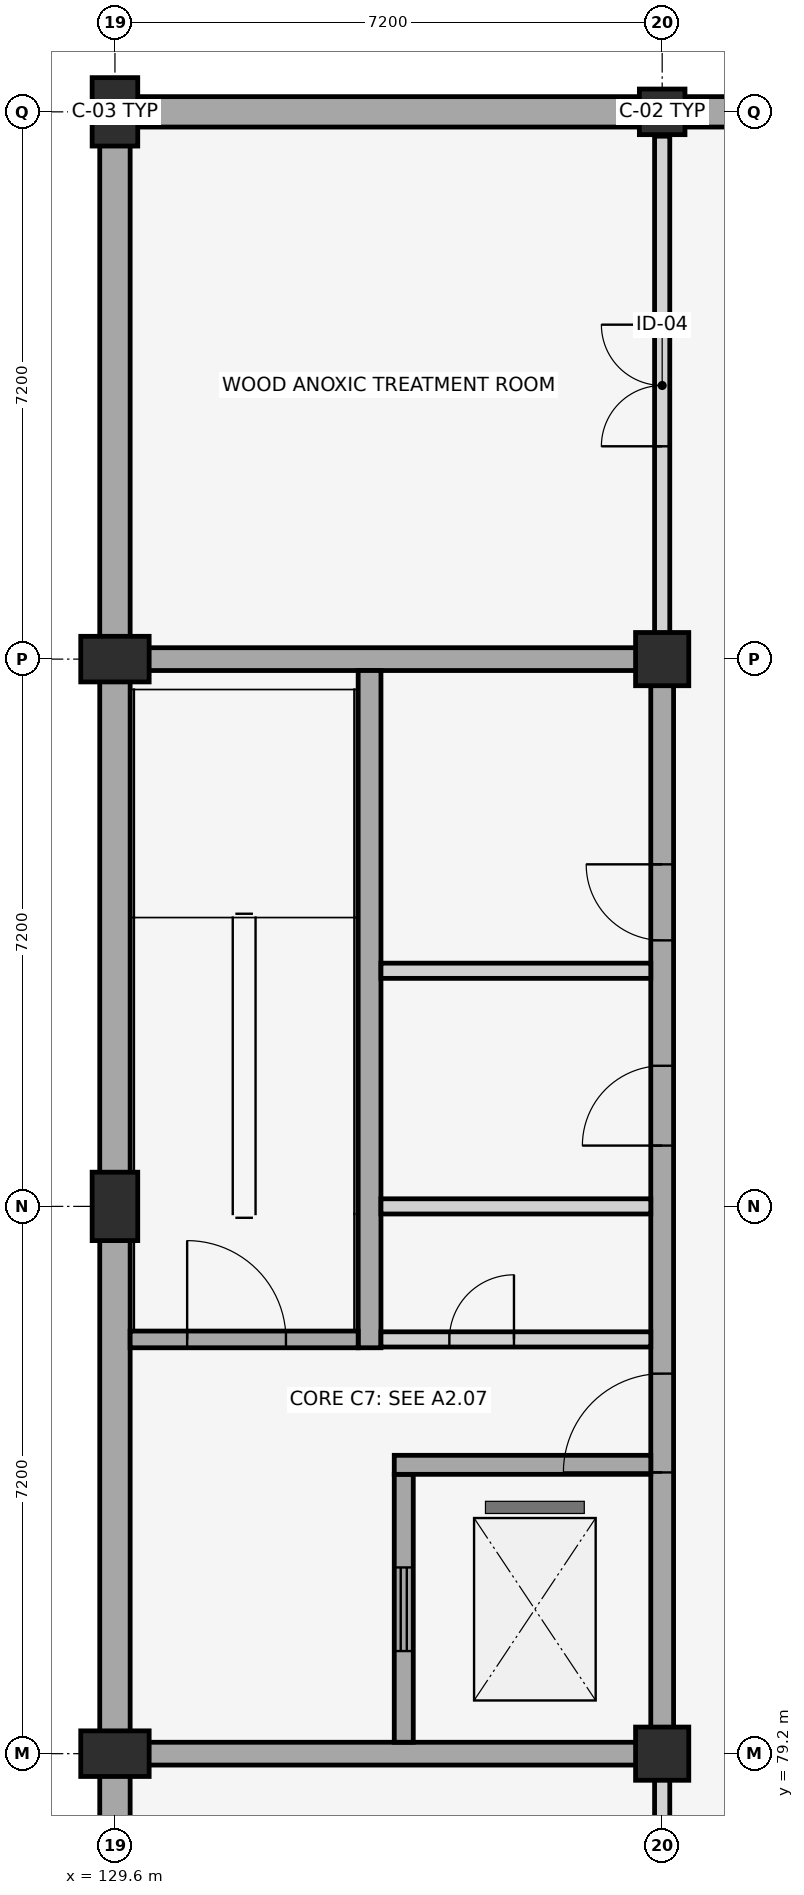
"""IFC4 building model, lengths in metres.
Left out: names, types, materials, properties, quantities, classifications, styles, units other than length and angle.
Written with IfcOpenShell. Run it as: python <this file> out.ifc"""

import sys

from ifc_helpers import new_model, si_unit, direction, frame, frame_2d, origin, origin_2d, place, context, subcontext, project, spatial, rectangle, extrude, element, fill, save


model = new_model("IFC4")
c1 = context("Model", 3, precision=1e-05, world=origin(), true_north=direction((0.0, 1.0)))
c2 = subcontext(c1, "Body", "Model", "MODEL_VIEW")
j1 = project(units=[si_unit("LENGTHUNIT", "METRE"), si_unit("PLANEANGLEUNIT", "RADIAN")], contexts=[c1])
p1 = place(None, origin())
s1 = spatial("IfcSite", under=j1, at=p1, CompositionType="ELEMENT")
p2 = place(p1, origin())
s2 = spatial("IfcBuilding", under=s1, at=p2, CompositionType="ELEMENT")
p3 = place(p2, frame((0.0, 0.0, -4.5)))
s3 = spatial("IfcBuildingStorey", under=s2, at=p3, CompositionType="ELEMENT", Elevation=-4.5)
p4 = place(p3, frame((165.8, 100.8, 0.0), z_axis=(0.0, 0.0, 1.0), x_axis=(-1.0, 0.0, 0.0)))
e1 = element("IfcWall", 1, at=p4, inside=s3, PredefinedType="USERDEFINED", context=c2, shape_type="SweptSolid", body=[
    extrude(rectangle(XDim=36.4, YDim=0.4, at=frame_2d((18.2, 0.0))), origin(), (0.0, 0.0, 1.0), 3.67),
])
p5 = place(p3, frame((129.6, 100.6, 0.0), z_axis=(0.0, 0.0, 1.0), x_axis=(0.0, -1.0, 0.0)))
e2 = element("IfcWall", 2, at=p5, inside=s3, PredefinedType="USERDEFINED", context=c2, shape_type="SweptSolid", body=[
    extrude(rectangle(XDim=86.0, YDim=0.4, at=frame_2d((43.0, 0.0))), origin(), (0.0, 0.0, 1.0), 3.67),
])
for number, where, z_axis, x_axis in (
    (3, (129.6, 79.2, -0.45), (0.0, 0.0, 1.0), (0.0, 1.0, 0.0)),
    (4, (129.6, 86.4, -0.45), (0.0, 0.0, 1.0), (1.0, 0.0, 0.0)),
    (5, (129.6, 93.6, -0.45), (0.0, 0.0, 1.0), (0.0, 1.0, 0.0)),
    (6, (129.6, 100.8, -0.45), (0.0, 0.0, 1.0), (1.0, 0.0, 0.0)),
):
    element("IfcColumn", number, at=place(p3, frame(where, z_axis=z_axis, x_axis=x_axis)), inside=s3, PredefinedType="PILASTER", context=c2, shape_type="SweptSolid", body=[
        extrude(rectangle(XDim=0.6, YDim=0.9, at=origin_2d()), origin(), (0.0, 0.0, 1.0), 4.95),
    ])
for number, where, z_axis, x_axis in (
    (7, (136.8, 79.2, -0.45), (0.0, 0.0, 1.0), (1.0, 0.0, 0.0)),
    (8, (136.8, 93.6, -0.45), (0.0, 0.0, 1.0), (1.0, 0.0, 0.0)),
):
    element("IfcColumn", number, at=place(p3, frame(where, z_axis=z_axis, x_axis=x_axis)), inside=s3, PredefinedType="COLUMN", context=c2, shape_type="SweptSolid", body=[
        extrude(rectangle(XDim=0.7, YDim=0.7, at=origin_2d()), origin(), (0.0, 0.0, 1.0), 4.95),
    ])
p6 = place(p3, frame((136.8, 100.8, -0.45), z_axis=(0.0, 0.0, 1.0), x_axis=(0.0, 1.0, 0.0)))
e9 = element("IfcColumn", 9, at=p6, inside=s3, PredefinedType="COLUMN", context=c2, shape_type="SweptSolid", body=[
    extrude(rectangle(XDim=0.6, YDim=0.6, at=origin_2d()), origin(), (0.0, 0.0, 1.0), 4.95),
])
for number, where, z_axis, x_axis in (
    (10, (129.8, 79.2, 0.0), (0.0, 0.0, 1.0), (1.0, 0.0, 0.0)),
    (11, (129.8, 93.6, 0.0), (0.0, 0.0, 1.0), (1.0, 0.0, 0.0)),
):
    element("IfcWall", number, at=place(p3, frame(where, z_axis=z_axis, x_axis=x_axis)), inside=s3, PredefinedType="SHEAR", context=c2, shape_type="SweptSolid", body=[
        extrude(rectangle(XDim=7.15, YDim=0.3, at=frame_2d((3.575, 0.0))), origin(), (0.0, 0.0, 1.0), 4.25),
    ])
p7 = place(p3, frame((136.8, 79.35, 0.0), z_axis=(0.0, 0.0, 1.0), x_axis=(0.0, 1.0, 0.0)))
e12 = element("IfcWall", 12, at=p7, inside=s3, PredefinedType="SHEAR", context=c2, shape_type="SweptSolid", body=[
    extrude(rectangle(XDim=14.1, YDim=0.3, at=frame_2d((7.05, 0.0))), origin(), (0.0, 0.0, 1.0), 4.25),
])
p8 = place(p7, frame((3.55, 0.0, 0.0)))
e13 = element("IfcOpeningElement", 13, at=p8, cuts=e12, PredefinedType="OPENING", context=c2, shape_type="SweptSolid", body=[
    extrude(rectangle(XDim=1.3, YDim=2.2, at=frame_2d((0.65, 1.1))), frame((0.0, 0.16, 0.0), z_axis=(0.0, -1.0, 0.0), x_axis=(1.0, 0.0, 0.0)), (0.0, 0.0, 1.0), 0.32),
])
p9 = place(p7, frame((7.85, 0.0, 0.0)))
e14 = element("IfcOpeningElement", 14, at=p9, cuts=e12, PredefinedType="OPENING", context=c2, shape_type="SweptSolid", body=[
    extrude(rectangle(XDim=1.05, YDim=2.15, at=frame_2d((0.525, 1.075))), frame((0.0, 0.16, 0.0), z_axis=(0.0, -1.0, 0.0), x_axis=(1.0, 0.0, 0.0)), (0.0, 0.0, 1.0), 0.32),
])
p10 = place(p7, frame((10.55, 0.0, 0.0)))
e15 = element("IfcOpeningElement", 15, at=p10, cuts=e12, PredefinedType="OPENING", context=c2, shape_type="SweptSolid", body=[
    extrude(rectangle(XDim=1.0, YDim=2.15, at=frame_2d((0.5, 1.075))), frame((0.0, 0.16, 0.0), z_axis=(0.0, -1.0, 0.0), x_axis=(1.0, 0.0, 0.0)), (0.0, 0.0, 1.0), 0.32),
])
p11 = place(p3, frame((133.4, 79.35, 0.0), z_axis=(0.0, 0.0, 1.0), x_axis=(0.0, 1.0, 0.0)))
e16 = element("IfcWall", 16, at=p11, inside=s3, PredefinedType="SHEAR", context=c2, shape_type="SweptSolid", body=[
    extrude(rectangle(XDim=3.525, YDim=0.25, at=frame_2d((1.762, 0.0))), origin(), (0.0, 0.0, 1.0), 4.25),
])
p12 = place(p11, frame((1.2, 0.0, 0.0)))
e17 = element("IfcOpeningElement", 17, at=p12, cuts=e16, PredefinedType="OPENING", context=c2, shape_type="SweptSolid", body=[
    extrude(rectangle(XDim=1.1, YDim=2.15, at=frame_2d((0.55, 1.075))), frame((0.0, 0.135, 0.0), z_axis=(0.0, -1.0, 0.0), x_axis=(1.0, 0.0, 0.0)), (0.0, 0.0, 1.0), 0.27),
])
p13 = place(p3, frame((132.95, 84.54, 0.0), z_axis=(0.0, 0.0, 1.0), x_axis=(0.0, 1.0, 0.0)))
e18 = element("IfcWall", 18, at=p13, inside=s3, PredefinedType="SHEAR", context=c2, shape_type="SweptSolid", body=[
    extrude(rectangle(XDim=8.91, YDim=0.3, at=frame_2d((4.455, 0.0))), origin(), (0.0, 0.0, 1.0), 4.25),
])
p14 = place(p3, frame((133.1, 84.65, 0.0), z_axis=(0.0, 0.0, 1.0), x_axis=(1.0, 0.0, 0.0)))
e19 = element("IfcWall", 19, at=p14, inside=s3, PredefinedType="PLUMBINGWALL", context=c2, shape_type="SweptSolid", body=[
    extrude(rectangle(XDim=3.55, YDim=0.2, at=frame_2d((1.775, 0.0))), origin(), (0.0, 0.0, 1.0), 3.67),
])
p15 = place(p14, frame((0.9, 0.0, 0.0)))
e20 = element("IfcOpeningElement", 20, at=p15, cuts=e19, PredefinedType="OPENING", context=c2, shape_type="SweptSolid", body=[
    extrude(rectangle(XDim=0.85, YDim=2.05, at=frame_2d((0.425, 1.025))), frame((0.0, 0.11, 0.0), z_axis=(0.0, -1.0, 0.0), x_axis=(1.0, 0.0, 0.0)), (0.0, 0.0, 1.0), 0.22),
])
p16 = place(p3, frame((129.8, 84.65, 0.0), z_axis=(0.0, 0.0, 1.0), x_axis=(1.0, 0.0, 0.0)))
e21 = element("IfcWall", 21, at=p16, inside=s3, PredefinedType="SHEAR", context=c2, shape_type="SweptSolid", body=[
    extrude(rectangle(XDim=3.0, YDim=0.22, at=frame_2d((1.5, 0.0))), origin(), (0.0, 0.0, 1.0), 4.25),
])
p17 = place(p16, frame((0.75, 0.0, 0.0)))
e22 = element("IfcOpeningElement", 22, at=p17, cuts=e21, PredefinedType="OPENING", context=c2, shape_type="SweptSolid", body=[
    extrude(rectangle(XDim=1.3, YDim=2.2, at=frame_2d((0.65, 1.1))), frame((0.0, 0.12, 0.0), z_axis=(0.0, -1.0, 0.0), x_axis=(1.0, 0.0, 0.0)), (0.0, 0.0, 1.0), 0.24),
])
p18 = place(p3, frame((133.275, 83.0, 0.0), z_axis=(0.0, 0.0, 1.0), x_axis=(1.0, 0.0, 0.0)))
e23 = element("IfcWall", 23, at=p18, inside=s3, PredefinedType="SHEAR", context=c2, shape_type="SweptSolid", body=[
    extrude(rectangle(XDim=3.375, YDim=0.25, at=frame_2d((1.688, 0.0))), origin(), (0.0, 0.0, 1.0), 4.25),
])
for number, where, z_axis, x_axis in (
    (24, (133.1, 86.4, 0.0), (0.0, 0.0, 1.0), (1.0, 0.0, 0.0)),
    (25, (133.1, 89.5, 0.0), (0.0, 0.0, 1.0), (1.0, 0.0, 0.0)),
):
    element("IfcWall", number, at=place(p3, frame(where, z_axis=z_axis, x_axis=x_axis)), inside=s3, PredefinedType="PLUMBINGWALL", context=c2, shape_type="SweptSolid", body=[
        extrude(rectangle(XDim=3.55, YDim=0.2, at=frame_2d((1.775, 0.0))), origin(), (0.0, 0.0, 1.0), 3.67),
    ])
p19 = place(p3, frame((136.8, 50.72, 0.0), z_axis=(0.0, 0.0, 1.0), x_axis=(0.0, 1.0, 0.0)))
e26 = element("IfcWall", 26, at=p19, inside=s3, PredefinedType="PARTITIONING", context=c2, shape_type="SweptSolid", body=[
    extrude(rectangle(XDim=28.16, YDim=0.2, at=frame_2d((14.08, 0.0))), origin(), (0.0, 0.0, 1.0), 3.45),
])
p20 = place(p19, frame((1.649, 0.0, 0.0)))
e27 = element("IfcOpeningElement", 27, at=p20, cuts=e26, PredefinedType="OPENING", context=c2, shape_type="SweptSolid", body=[
    extrude(rectangle(XDim=1.6, YDim=2.35, at=frame_2d((0.8, 1.175))), frame((0.0, 0.11, 0.0), z_axis=(0.0, -1.0, 0.0), x_axis=(1.0, 0.0, 0.0)), (0.0, 0.0, 1.0), 0.22),
])
p21 = place(p3, frame((136.8, 93.92, 0.0), z_axis=(0.0, 0.0, 1.0), x_axis=(0.0, 1.0, 0.0)))
e28 = element("IfcWall", 28, at=p21, inside=s3, PredefinedType="PARTITIONING", context=c2, shape_type="SweptSolid", body=[
    extrude(rectangle(XDim=6.56, YDim=0.2, at=frame_2d((3.28, 0.0))), origin(), (0.0, 0.0, 1.0), 3.45),
])
p22 = place(p21, frame((2.48, 0.0, 0.0)))
e29 = element("IfcOpeningElement", 29, at=p22, cuts=e28, PredefinedType="OPENING", context=c2, shape_type="SweptSolid", body=[
    extrude(rectangle(XDim=1.6, YDim=2.35, at=frame_2d((0.8, 1.175))), frame((0.0, 0.11, 0.0), z_axis=(0.0, -1.0, 0.0), x_axis=(1.0, 0.0, 0.0)), (0.0, 0.0, 1.0), 0.22),
])
p23 = place(p8, origin())
e30 = element("IfcDoor", 30, at=p23, inside=s3, OperationType="SINGLE_SWING_LEFT", PredefinedType="DOOR", context=c2, shape_type="SweptSolid", body=[
    extrude(rectangle(XDim=1.3, YDim=2.2, at=frame_2d((0.65, 1.1))), frame((0.0, 0.025, 0.0), z_axis=(0.0, -1.0, 0.0), x_axis=(1.0, 0.0, 0.0)), (0.0, 0.0, 1.0), 0.05),
])
fill(e13, e30)
p24 = place(p9, origin())
e31 = element("IfcDoor", 31, at=p24, inside=s3, OperationType="SINGLE_SWING_LEFT", PredefinedType="DOOR", context=c2, shape_type="SweptSolid", body=[
    extrude(rectangle(XDim=1.05, YDim=2.15, at=frame_2d((0.525, 1.075))), frame((0.0, 0.025, 0.0), z_axis=(0.0, -1.0, 0.0), x_axis=(1.0, 0.0, 0.0)), (0.0, 0.0, 1.0), 0.05),
])
fill(e14, e31)
p25 = place(p10, origin())
e32 = element("IfcDoor", 32, at=p25, inside=s3, OperationType="SINGLE_SWING_RIGHT", PredefinedType="DOOR", context=c2, shape_type="SweptSolid", body=[
    extrude(rectangle(XDim=1.0, YDim=2.15, at=frame_2d((0.5, 1.075))), frame((0.0, 0.025, 0.0), z_axis=(0.0, -1.0, 0.0), x_axis=(1.0, 0.0, 0.0)), (0.0, 0.0, 1.0), 0.05),
])
fill(e15, e32)
p26 = place(p12, origin())
e33 = element("IfcDoor", 33, at=p26, inside=s3, OperationType="SLIDING_TO_LEFT", PredefinedType="DOOR", context=c2, shape_type="SweptSolid", body=[
    extrude(rectangle(XDim=1.1, YDim=2.15, at=frame_2d((0.55, 1.075))), frame((0.0, 0.025, 0.0), z_axis=(0.0, -1.0, 0.0), x_axis=(1.0, 0.0, 0.0)), (0.0, 0.0, 1.0), 0.05),
])
fill(e17, e33)
p27 = place(p15, origin())
e34 = element("IfcDoor", 34, at=p27, inside=s3, OperationType="SINGLE_SWING_RIGHT", PredefinedType="TRAPDOOR", context=c2, shape_type="SweptSolid", body=[
    extrude(rectangle(XDim=0.85, YDim=2.05, at=frame_2d((0.425, 1.025))), frame((0.0, 0.025, 0.0), z_axis=(0.0, -1.0, 0.0), x_axis=(1.0, 0.0, 0.0)), (0.0, 0.0, 1.0), 0.05),
])
fill(e20, e34)
p28 = place(p17, origin())
e35 = element("IfcDoor", 35, at=p28, inside=s3, OperationType="SINGLE_SWING_LEFT", PredefinedType="DOOR", context=c2, shape_type="SweptSolid", body=[
    extrude(rectangle(XDim=1.3, YDim=2.2, at=frame_2d((0.65, 1.1))), frame((0.0, 0.025, 0.0), z_axis=(0.0, -1.0, 0.0), x_axis=(1.0, 0.0, 0.0)), (0.0, 0.0, 1.0), 0.05),
])
fill(e22, e35)
p29 = place(p22, origin())
e36 = element("IfcDoor", 36, at=p29, inside=s3, OperationType="DOUBLE_DOOR_SINGLE_SWING", PredefinedType="DOOR", context=c2, shape_type="SweptSolid", body=[
    extrude(rectangle(XDim=1.6, YDim=2.35, at=frame_2d((0.8, 1.175))), frame((0.0, 0.025, 0.0), z_axis=(0.0, -1.0, 0.0), x_axis=(1.0, 0.0, 0.0)), (0.0, 0.0, 1.0), 0.05),
])
fill(e29, e36)
save(model, sys.argv[1])
